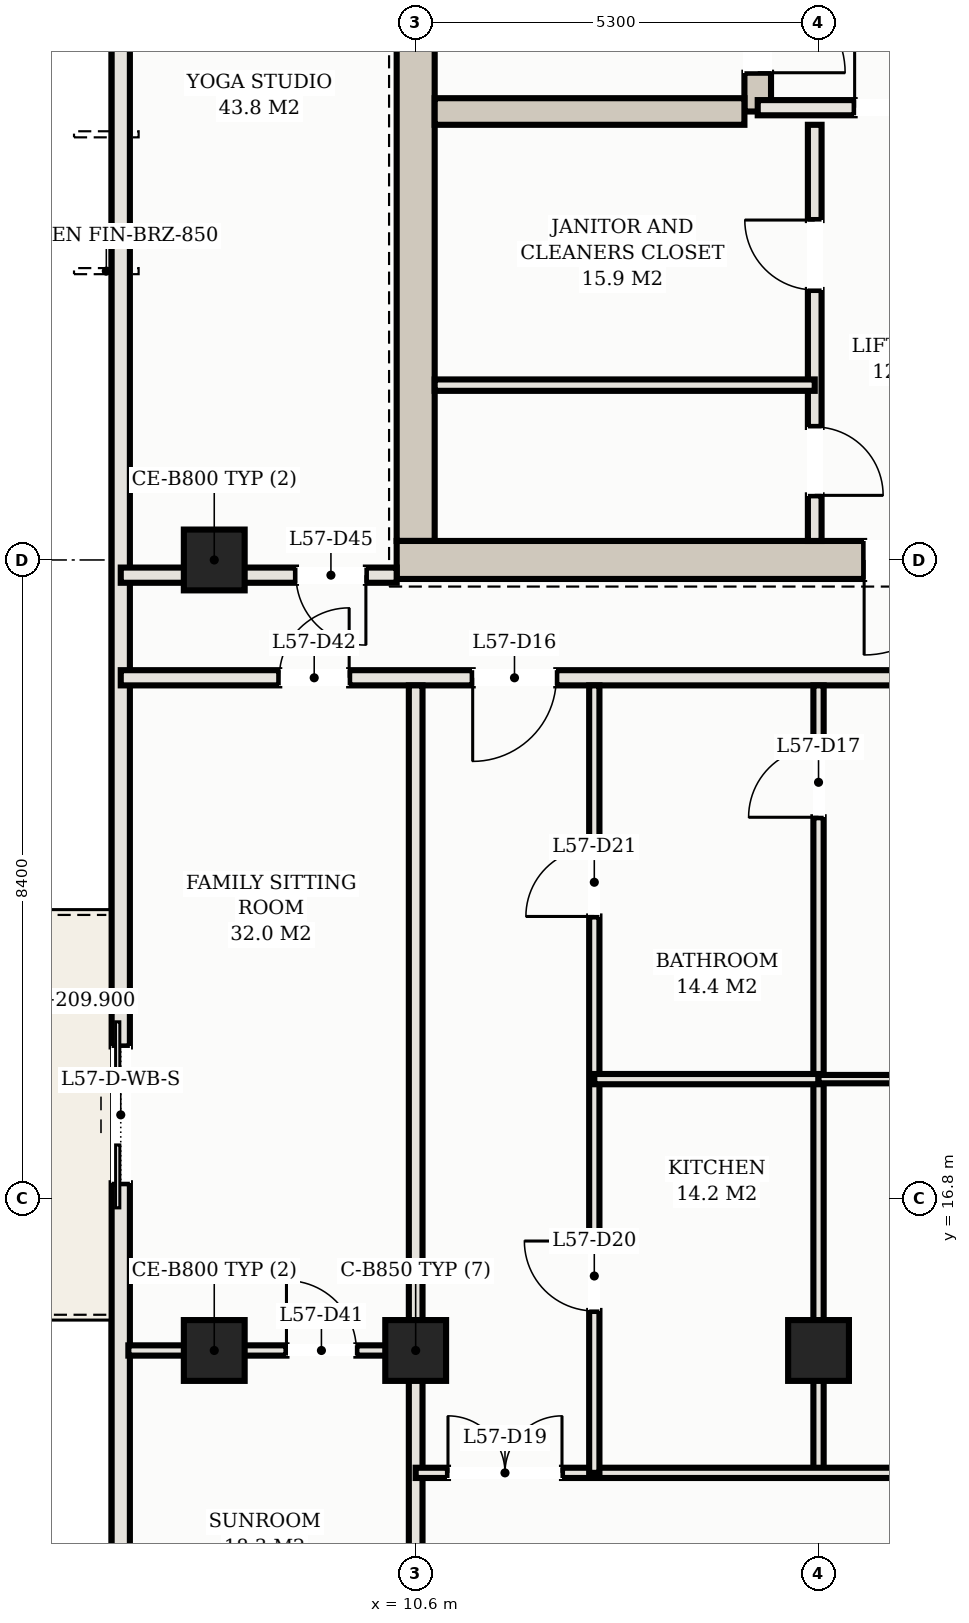
"""IFC4 building model, lengths in metres.
Left out: names, types, materials, properties, quantities, classifications, styles, units other than length and angle.
Written with IfcOpenShell. Run it as: python <this file> out.ifc"""

import sys

from ifc_helpers import new_model, si_unit, direction, frame, frame_2d, origin, origin_2d, place, context, subcontext, project, spatial, rectangle, hollow_rectangle, extrude, element, fill, save


model = new_model("IFC4")
c1 = context("Model", 3, precision=1e-05, world=origin(), true_north=direction((0.0, 1.0)))
c2 = subcontext(c1, "Body", "Model", "MODEL_VIEW")
j1 = project(units=[si_unit("LENGTHUNIT", "METRE"), si_unit("PLANEANGLEUNIT", "RADIAN")], contexts=[c1])
p1 = place(None, origin())
s1 = spatial("IfcSite", under=j1, at=p1, CompositionType="ELEMENT")
p2 = place(p1, origin())
s2 = spatial("IfcBuilding", under=s1, at=p2, CompositionType="ELEMENT")
p3 = place(p2, frame((0.0, 0.0, 209.9)))
s3 = spatial("IfcBuildingStorey", under=s2, at=p3, CompositionType="ELEMENT", Elevation=209.9)
p4 = place(p3, frame((10.6, 25.45, 0.0), z_axis=(0.0, 0.0, 1.0), x_axis=(0.0, 1.0, 0.0)))
e1 = element("IfcWall", 1, at=p4, inside=s3, PredefinedType="SHEAR", context=c2, shape_type="SweptSolid", body=[
    extrude(rectangle(XDim=14.3, YDim=0.5, at=frame_2d((7.15, 0.0))), origin(), (0.0, 0.0, 1.0), 3.11),
])
p5 = place(p3, frame((10.35, 25.2, 0.0), z_axis=(0.0, 0.0, 1.0), x_axis=(1.0, 0.0, 0.0)))
e2 = element("IfcWall", 2, at=p5, inside=s3, PredefinedType="SHEAR", context=c2, shape_type="SweptSolid", body=[
    extrude(rectangle(XDim=8.05, YDim=0.5, at=frame_2d((4.025, 0.0))), origin(), (0.0, 0.0, 1.0), 3.11),
])
p6 = place(p5, frame((6.15, 0.0, 0.0)))
e3 = element("IfcOpeningElement", 3, at=p6, cuts=e2, PredefinedType="OPENING", context=c2, shape_type="SweptSolid", body=[
    extrude(rectangle(XDim=1.25, YDim=2.2, at=frame_2d((0.625, 1.1))), frame((0.0, 0.26, 0.0), z_axis=(0.0, -1.0, 0.0), x_axis=(1.0, 0.0, 0.0)), (0.0, 0.0, 1.0), 0.52),
])
p7 = place(p3, frame((15.1, 31.1, 0.0), z_axis=(0.0, 0.0, 1.0), x_axis=(0.0, 1.0, 0.0)))
e4 = element("IfcWall", 4, at=p7, inside=s3, PredefinedType="SHEAR", context=c2, shape_type="SweptSolid", body=[
    extrude(rectangle(XDim=8.65, YDim=0.35, at=frame_2d((4.325, 0.0))), origin(), (0.0, 0.0, 1.0), 3.11),
])
p8 = place(p7, frame((0.51, 0.0, 0.0)))
e5 = element("IfcOpeningElement", 5, at=p8, cuts=e4, PredefinedType="OPENING", context=c2, shape_type="SweptSolid", body=[
    extrude(rectangle(XDim=1.15, YDim=2.2, at=frame_2d((0.575, 1.1))), frame((0.0, 0.185, 0.0), z_axis=(0.0, -1.0, 0.0), x_axis=(1.0, 0.0, 0.0)), (0.0, 0.0, 1.0), 0.37),
])
p9 = place(p3, frame((10.85, 31.1, 0.0), z_axis=(0.0, 0.0, 1.0), x_axis=(1.0, 0.0, 0.0)))
e6 = element("IfcWall", 6, at=p9, inside=s3, PredefinedType="SHEAR", context=c2, shape_type="SweptSolid", body=[
    extrude(rectangle(XDim=4.075, YDim=0.35, at=frame_2d((2.038, 0.0))), origin(), (0.0, 0.0, 1.0), 3.11),
])
for number, where, z_axis, x_axis in (
    (7, (10.6, 14.8, 0.0), (0.0, 0.0, 1.0), (1.0, 0.0, 0.0)),
    (8, (15.9, 14.8, 0.0), (0.0, 0.0, 1.0), (1.0, 0.0, 0.0)),
    (9, (7.95, 14.8, 0.0), (0.0, 0.0, 1.0), (1.0, 0.0, 0.0)),
    (10, (7.95, 25.2, 0.0), (0.0, 0.0, 1.0), (1.0, 0.0, 0.0)),
):
    element("IfcColumn", number, at=place(p3, frame(where, z_axis=z_axis, x_axis=x_axis)), inside=s3, PredefinedType="COLUMN", context=c2, shape_type="SweptSolid", body=[
        extrude(hollow_rectangle(XDim=0.8, YDim=0.8, WallThickness=0.028, at=origin_2d()), origin(), (0.0, 0.0, 1.0), 3.3),
    ])
p10 = place(p3, frame((6.72, 36.93, 0.0), z_axis=(0.0, 0.0, 1.0), x_axis=(0.0, -1.0, 0.0)))
e11 = element("IfcWall", 11, at=p10, inside=s3, PredefinedType="SOLIDWALL", context=c2, shape_type="SweptSolid", body=[
    extrude(rectangle(XDim=26.41, YDim=0.24, at=frame_2d((13.205, 0.0))), origin(), (0.0, 0.0, 1.0), 3.11),
])
p11 = place(p10, frame((18.13, 0.0, 0.0)))
e12 = element("IfcOpeningElement", 12, at=p11, cuts=e11, PredefinedType="OPENING", context=c2, shape_type="SweptSolid", body=[
    extrude(rectangle(XDim=1.8, YDim=2.2, at=frame_2d((0.9, 1.1))), frame((0.0, 0.13, 0.0), z_axis=(0.0, -1.0, 0.0), x_axis=(1.0, 0.0, 0.0)), (0.0, 0.0, 1.0), 0.26),
])
p12 = place(p3, frame((15.1, 31.15, 0.0), z_axis=(0.0, 0.0, 1.0), x_axis=(1.0, 0.0, 0.0)))
e13 = element("IfcWall", 13, at=p12, inside=s3, PredefinedType="PARTITIONING", context=c2, shape_type="SweptSolid", body=[
    extrude(rectangle(XDim=3.25, YDim=0.2, at=frame_2d((1.625, 0.0))), origin(), (0.0, 0.0, 1.0), 2.43),
])
p13 = place(p12, frame((1.275, 0.0, 0.0)))
e14 = element("IfcOpeningElement", 14, at=p13, cuts=e13, PredefinedType="OPENING", context=c2, shape_type="SweptSolid", body=[
    extrude(rectangle(XDim=1.25, YDim=2.2, at=frame_2d((0.625, 1.1))), frame((0.0, 0.11, 0.0), z_axis=(0.0, -1.0, 0.0), x_axis=(1.0, 0.0, 0.0)), (0.0, 0.0, 1.0), 0.22),
])
p14 = place(p3, frame((15.85, 25.45, 0.0), z_axis=(0.0, 0.0, 1.0), x_axis=(0.0, 1.0, 0.0)))
e15 = element("IfcWall", 15, at=p14, inside=s3, PredefinedType="PARTITIONING", context=c2, shape_type="SweptSolid", body=[
    extrude(rectangle(XDim=5.475, YDim=0.18, at=frame_2d((2.738, 0.0))), origin(), (0.0, 0.0, 1.0), 2.43),
])
p15 = place(p14, frame((0.6, 0.0, 0.0)))
e16 = element("IfcOpeningElement", 16, at=p15, cuts=e15, PredefinedType="OPENING", context=c2, shape_type="SweptSolid", body=[
    extrude(rectangle(XDim=0.9, YDim=2.15, at=frame_2d((0.45, 1.075))), frame((0.0, 0.1, 0.0), z_axis=(0.0, -1.0, 0.0), x_axis=(1.0, 0.0, 0.0)), (0.0, 0.0, 1.0), 0.2),
])
p16 = place(p14, frame((3.302, 0.0, 0.0)))
e17 = element("IfcOpeningElement", 17, at=p16, cuts=e15, PredefinedType="OPENING", context=c2, shape_type="SweptSolid", body=[
    extrude(rectangle(XDim=0.92, YDim=2.15, at=frame_2d((0.46, 1.075))), frame((0.0, 0.1, 0.0), z_axis=(0.0, -1.0, 0.0), x_axis=(1.0, 0.0, 0.0)), (0.0, 0.0, 1.0), 0.2),
])
p17 = place(p3, frame((10.85, 27.5, 0.0), z_axis=(0.0, 0.0, 1.0), x_axis=(1.0, 0.0, 0.0)))
e18 = element("IfcWall", 18, at=p17, inside=s3, PredefinedType="PARTITIONING", context=c2, shape_type="SweptSolid", body=[
    extrude(rectangle(XDim=5.0, YDim=0.15, at=frame_2d((2.5, 0.0))), origin(), (0.0, 0.0, 1.0), 2.43),
])
p18 = place(p3, frame((6.72, 23.65, 0.0), z_axis=(0.0, 0.0, 1.0), x_axis=(1.0, 0.0, 0.0)))
e19 = element("IfcWall", 19, at=p18, inside=s3, PredefinedType="PARTITIONING", context=c2, shape_type="SweptSolid", body=[
    extrude(rectangle(XDim=39.56, YDim=0.2, at=frame_2d((19.78, 0.0))), origin(), (0.0, 0.0, 1.0), 2.43),
])
p19 = place(p18, frame((4.63, 0.0, 0.0)))
e20 = element("IfcOpeningElement", 20, at=p19, cuts=e19, PredefinedType="OPENING", context=c2, shape_type="SweptSolid", body=[
    extrude(rectangle(XDim=1.1, YDim=2.25, at=frame_2d((0.55, 1.125))), frame((0.0, 0.11, 0.0), z_axis=(0.0, -1.0, 0.0), x_axis=(1.0, 0.0, 0.0)), (0.0, 0.0, 1.0), 0.22),
])
p20 = place(p18, frame((20.53, 0.0, 0.0)))
e21 = element("IfcOpeningElement", 21, at=p20, cuts=e19, PredefinedType="OPENING", context=c2, shape_type="SweptSolid", body=[
    extrude(rectangle(XDim=1.1, YDim=2.25, at=frame_2d((0.55, 1.125))), frame((0.0, 0.11, 0.0), z_axis=(0.0, -1.0, 0.0), x_axis=(1.0, 0.0, 0.0)), (0.0, 0.0, 1.0), 0.22),
])
p21 = place(p18, frame((2.085, 0.0, 0.0)))
e22 = element("IfcOpeningElement", 22, at=p21, cuts=e19, PredefinedType="OPENING", context=c2, shape_type="SweptSolid", body=[
    extrude(rectangle(XDim=0.92, YDim=2.15, at=frame_2d((0.46, 1.075))), frame((0.0, 0.11, 0.0), z_axis=(0.0, -1.0, 0.0), x_axis=(1.0, 0.0, 0.0)), (0.0, 0.0, 1.0), 0.22),
])
p22 = place(p18, frame((36.555, 0.0, 0.0)))
e23 = element("IfcOpeningElement", 23, at=p22, cuts=e19, PredefinedType="OPENING", context=c2, shape_type="SweptSolid", body=[
    extrude(rectangle(XDim=0.92, YDim=2.15, at=frame_2d((0.46, 1.075))), frame((0.0, 0.11, 0.0), z_axis=(0.0, -1.0, 0.0), x_axis=(1.0, 0.0, 0.0)), (0.0, 0.0, 1.0), 0.22),
])
p23 = place(p3, frame((6.72, 25.0, 0.0), z_axis=(0.0, 0.0, 1.0), x_axis=(1.0, 0.0, 0.0)))
e24 = element("IfcWall", 24, at=p23, inside=s3, PredefinedType="PARTITIONING", context=c2, shape_type="SweptSolid", body=[
    extrude(rectangle(XDim=3.63, YDim=0.2, at=frame_2d((1.815, 0.0))), origin(), (0.0, 0.0, 1.0), 2.43),
])
p24 = place(p23, frame((2.305, 0.0, 0.0)))
e25 = element("IfcOpeningElement", 25, at=p24, cuts=e24, PredefinedType="OPENING", context=c2, shape_type="SweptSolid", body=[
    extrude(rectangle(XDim=0.92, YDim=2.15, at=frame_2d((0.46, 1.075))), frame((0.0, 0.11, 0.0), z_axis=(0.0, -1.0, 0.0), x_axis=(1.0, 0.0, 0.0)), (0.0, 0.0, 1.0), 0.22),
])
p25 = place(p3, frame((10.6, 8.32, 0.0), z_axis=(0.0, 0.0, 1.0), x_axis=(0.0, 1.0, 0.0)))
e26 = element("IfcWall", 26, at=p25, inside=s3, PredefinedType="PARTITIONING", context=c2, shape_type="SweptSolid", body=[
    extrude(rectangle(XDim=15.23, YDim=0.18, at=frame_2d((7.615, 0.0))), origin(), (0.0, 0.0, 1.0), 2.43),
])
p26 = place(p3, frame((15.9, 14.8, 0.0), z_axis=(0.0, 0.0, 1.0), x_axis=(0.0, 1.0, 0.0)))
e27 = element("IfcWall", 27, at=p26, inside=s3, PredefinedType="PARTITIONING", context=c2, shape_type="SweptSolid", body=[
    extrude(rectangle(XDim=8.75, YDim=0.135, at=frame_2d((4.375, 0.0))), origin(), (0.0, 0.0, 1.0), 2.43),
])
p27 = place(p26, frame((7.015, 0.0, 0.0)))
e28 = element("IfcOpeningElement", 28, at=p27, cuts=e27, PredefinedType="OPENING", context=c2, shape_type="SweptSolid", body=[
    extrude(rectangle(XDim=0.92, YDim=2.15, at=frame_2d((0.46, 1.075))), frame((0.0, 0.078, 0.0), z_axis=(0.0, -1.0, 0.0), x_axis=(1.0, 0.0, 0.0)), (0.0, 0.0, 1.0), 0.155),
])
p28 = place(p3, frame((15.9, 13.19, 0.0), z_axis=(0.0, 0.0, 1.0), x_axis=(0.0, 1.0, 0.0)))
e29 = element("IfcWall", 29, at=p28, inside=s3, PredefinedType="PARTITIONING", context=c2, shape_type="SweptSolid", body=[
    extrude(rectangle(XDim=1.61, YDim=0.135, at=frame_2d((0.805, 0.0))), origin(), (0.0, 0.0, 1.0), 2.43),
])
p29 = place(p3, frame((10.6, 13.19, 0.0), z_axis=(0.0, 0.0, 1.0), x_axis=(1.0, 0.0, 0.0)))
e30 = element("IfcWall", 30, at=p29, inside=s3, PredefinedType="PARTITIONING", context=c2, shape_type="SweptSolid", body=[
    extrude(rectangle(XDim=10.6, YDim=0.135, at=frame_2d((5.3, 0.0))), origin(), (0.0, 0.0, 1.0), 2.43),
])
p30 = place(p29, frame((0.425, 0.0, 0.0)))
e31 = element("IfcOpeningElement", 31, at=p30, cuts=e30, PredefinedType="OPENING", context=c2, shape_type="SweptSolid", body=[
    extrude(rectangle(XDim=1.5, YDim=2.25, at=frame_2d((0.75, 1.125))), frame((0.0, 0.078, 0.0), z_axis=(0.0, -1.0, 0.0), x_axis=(1.0, 0.0, 0.0)), (0.0, 0.0, 1.0), 0.155),
])
p31 = place(p3, frame((12.95, 13.19, 0.0), z_axis=(0.0, 0.0, 1.0), x_axis=(0.0, 1.0, 0.0)))
e32 = element("IfcWall", 32, at=p31, inside=s3, PredefinedType="PARTITIONING", context=c2, shape_type="SweptSolid", body=[
    extrude(rectangle(XDim=10.36, YDim=0.135, at=frame_2d((5.18, 0.0))), origin(), (0.0, 0.0, 1.0), 2.43),
])
p32 = place(p31, frame((2.13, 0.0, 0.0)))
e33 = element("IfcOpeningElement", 33, at=p32, cuts=e32, PredefinedType="OPENING", context=c2, shape_type="SweptSolid", body=[
    extrude(rectangle(XDim=0.92, YDim=2.15, at=frame_2d((0.46, 1.075))), frame((0.0, 0.078, 0.0), z_axis=(0.0, -1.0, 0.0), x_axis=(1.0, 0.0, 0.0)), (0.0, 0.0, 1.0), 0.155),
])
p33 = place(p31, frame((7.32, 0.0, 0.0)))
e34 = element("IfcOpeningElement", 34, at=p33, cuts=e32, PredefinedType="OPENING", context=c2, shape_type="SweptSolid", body=[
    extrude(rectangle(XDim=0.9, YDim=2.15, at=frame_2d((0.45, 1.075))), frame((0.0, 0.078, 0.0), z_axis=(0.0, -1.0, 0.0), x_axis=(1.0, 0.0, 0.0)), (0.0, 0.0, 1.0), 0.155),
])
p34 = place(p3, frame((12.95, 18.37, 0.0), z_axis=(0.0, 0.0, 1.0), x_axis=(1.0, 0.0, 0.0)))
e35 = element("IfcWall", 35, at=p34, inside=s3, PredefinedType="PARTITIONING", context=c2, shape_type="SweptSolid", body=[
    extrude(rectangle(XDim=2.95, YDim=0.135, at=frame_2d((1.475, 0.0))), origin(), (0.0, 0.0, 1.0), 2.43),
])
p35 = place(p3, frame((15.9, 18.37, 0.0), z_axis=(0.0, 0.0, 1.0), x_axis=(1.0, 0.0, 0.0)))
e36 = element("IfcWall", 36, at=p35, inside=s3, PredefinedType="MOVABLE", context=c2, shape_type="SweptSolid", body=[
    extrude(rectangle(XDim=5.3, YDim=0.11, at=frame_2d((2.65, 0.0))), origin(), (0.0, 0.0, 1.0), 2.43),
])
p36 = place(p35, frame((1.84, 0.0, 0.0)))
e37 = element("IfcOpeningElement", 37, at=p36, cuts=e36, PredefinedType="OPENING", context=c2, shape_type="SweptSolid", body=[
    extrude(rectangle(XDim=0.92, YDim=2.15, at=frame_2d((0.46, 1.075))), frame((0.0, 0.065, 0.0), z_axis=(0.0, -1.0, 0.0), x_axis=(1.0, 0.0, 0.0)), (0.0, 0.0, 1.0), 0.13),
])
p37 = place(p3, frame((6.82, 14.8, 0.0), z_axis=(0.0, 0.0, 1.0), x_axis=(1.0, 0.0, 0.0)))
e38 = element("IfcWall", 38, at=p37, inside=s3, PredefinedType="PARTITIONING", context=c2, shape_type="SweptSolid", body=[
    extrude(rectangle(XDim=3.78, YDim=0.135, at=frame_2d((1.89, 0.0))), origin(), (0.0, 0.0, 1.0), 2.43),
])
p38 = place(p37, frame((2.08, 0.0, 0.0)))
e39 = element("IfcOpeningElement", 39, at=p38, cuts=e38, PredefinedType="OPENING", context=c2, shape_type="SweptSolid", body=[
    extrude(rectangle(XDim=0.92, YDim=2.15, at=frame_2d((0.46, 1.075))), frame((0.0, 0.078, 0.0), z_axis=(0.0, -1.0, 0.0), x_axis=(1.0, 0.0, 0.0)), (0.0, 0.0, 1.0), 0.155),
])
p39 = place(p11, frame((1.8, 0.0, 0.0), z_axis=(0.0, 0.0, 1.0), x_axis=(-1.0, 0.0, 0.0)))
e40 = element("IfcDoor", 40, at=p39, inside=s3, OperationType="DOUBLE_DOOR_SLIDING", PredefinedType="DOOR", context=c2, shape_type="SweptSolid", body=[
    extrude(rectangle(XDim=1.8, YDim=2.2, at=frame_2d((0.9, 1.1))), frame((0.0, 0.025, 0.0), z_axis=(0.0, -1.0, 0.0), x_axis=(1.0, 0.0, 0.0)), (0.0, 0.0, 1.0), 0.05),
])
fill(e12, e40)
p40 = place(p6, frame((1.25, 0.0, 0.0), z_axis=(0.0, 0.0, 1.0), x_axis=(-1.0, 0.0, 0.0)))
e41 = element("IfcDoor", 41, at=p40, inside=s3, OperationType="SINGLE_SWING_RIGHT", PredefinedType="DOOR", context=c2, shape_type="SweptSolid", body=[
    extrude(rectangle(XDim=1.25, YDim=2.2, at=frame_2d((0.625, 1.1))), frame((0.0, 0.025, 0.0), z_axis=(0.0, -1.0, 0.0), x_axis=(1.0, 0.0, 0.0)), (0.0, 0.0, 1.0), 0.05),
])
fill(e3, e41)
p41 = place(p13, origin())
e42 = element("IfcDoor", 42, at=p41, inside=s3, OperationType="SINGLE_SWING_LEFT", PredefinedType="DOOR", context=c2, shape_type="SweptSolid", body=[
    extrude(rectangle(XDim=1.25, YDim=2.2, at=frame_2d((0.625, 1.1))), frame((0.0, 0.025, 0.0), z_axis=(0.0, -1.0, 0.0), x_axis=(1.0, 0.0, 0.0)), (0.0, 0.0, 1.0), 0.05),
])
fill(e14, e42)
p42 = place(p8, frame((1.15, 0.0, 0.0), z_axis=(0.0, 0.0, 1.0), x_axis=(-1.0, 0.0, 0.0)))
e43 = element("IfcDoor", 43, at=p42, inside=s3, OperationType="SINGLE_SWING_RIGHT", PredefinedType="DOOR", context=c2, shape_type="SweptSolid", body=[
    extrude(rectangle(XDim=1.15, YDim=2.2, at=frame_2d((0.575, 1.1))), frame((0.0, 0.025, 0.0), z_axis=(0.0, -1.0, 0.0), x_axis=(1.0, 0.0, 0.0)), (0.0, 0.0, 1.0), 0.05),
])
fill(e5, e43)
p43 = place(p15, frame((0.9, 0.0, 0.0), z_axis=(0.0, 0.0, 1.0), x_axis=(-1.0, 0.0, 0.0)))
e44 = element("IfcDoor", 44, at=p43, inside=s3, OperationType="SINGLE_SWING_RIGHT", PredefinedType="DOOR", context=c2, shape_type="SweptSolid", body=[
    extrude(rectangle(XDim=0.9, YDim=2.15, at=frame_2d((0.45, 1.075))), frame((0.0, 0.025, 0.0), z_axis=(0.0, -1.0, 0.0), x_axis=(1.0, 0.0, 0.0)), (0.0, 0.0, 1.0), 0.05),
])
fill(e16, e44)
p44 = place(p16, origin())
e45 = element("IfcDoor", 45, at=p44, inside=s3, OperationType="SINGLE_SWING_RIGHT", PredefinedType="DOOR", context=c2, shape_type="SweptSolid", body=[
    extrude(rectangle(XDim=0.92, YDim=2.15, at=frame_2d((0.46, 1.075))), frame((0.0, 0.025, 0.0), z_axis=(0.0, -1.0, 0.0), x_axis=(1.0, 0.0, 0.0)), (0.0, 0.0, 1.0), 0.05),
])
fill(e17, e45)
p45 = place(p19, frame((1.1, 0.0, 0.0), z_axis=(0.0, 0.0, 1.0), x_axis=(-1.0, 0.0, 0.0)))
e46 = element("IfcDoor", 46, at=p45, inside=s3, OperationType="SINGLE_SWING_RIGHT", PredefinedType="DOOR", context=c2, shape_type="SweptSolid", body=[
    extrude(rectangle(XDim=1.1, YDim=2.25, at=frame_2d((0.55, 1.125))), frame((0.0, 0.025, 0.0), z_axis=(0.0, -1.0, 0.0), x_axis=(1.0, 0.0, 0.0)), (0.0, 0.0, 1.0), 0.05),
])
fill(e20, e46)
p46 = place(p27, origin())
e47 = element("IfcDoor", 47, at=p46, inside=s3, OperationType="SINGLE_SWING_LEFT", PredefinedType="DOOR", context=c2, shape_type="SweptSolid", body=[
    extrude(rectangle(XDim=0.92, YDim=2.15, at=frame_2d((0.46, 1.075))), frame((0.0, 0.025, 0.0), z_axis=(0.0, -1.0, 0.0), x_axis=(1.0, 0.0, 0.0)), (0.0, 0.0, 1.0), 0.05),
])
fill(e28, e47)
p47 = place(p30, origin())
e48 = element("IfcDoor", 48, at=p47, inside=s3, OperationType="DOUBLE_DOOR_SINGLE_SWING", PredefinedType="DOOR", context=c2, shape_type="SweptSolid", body=[
    extrude(rectangle(XDim=1.5, YDim=2.25, at=frame_2d((0.75, 1.125))), frame((0.0, 0.025, 0.0), z_axis=(0.0, -1.0, 0.0), x_axis=(1.0, 0.0, 0.0)), (0.0, 0.0, 1.0), 0.05),
])
fill(e31, e48)
p48 = place(p32, origin())
e49 = element("IfcDoor", 49, at=p48, inside=s3, OperationType="SINGLE_SWING_RIGHT", PredefinedType="DOOR", context=c2, shape_type="SweptSolid", body=[
    extrude(rectangle(XDim=0.92, YDim=2.15, at=frame_2d((0.46, 1.075))), frame((0.0, 0.025, 0.0), z_axis=(0.0, -1.0, 0.0), x_axis=(1.0, 0.0, 0.0)), (0.0, 0.0, 1.0), 0.05),
])
fill(e33, e49)
p49 = place(p33, origin())
e50 = element("IfcDoor", 50, at=p49, inside=s3, OperationType="SINGLE_SWING_LEFT", PredefinedType="DOOR", context=c2, shape_type="SweptSolid", body=[
    extrude(rectangle(XDim=0.9, YDim=2.15, at=frame_2d((0.45, 1.075))), frame((0.0, 0.025, 0.0), z_axis=(0.0, -1.0, 0.0), x_axis=(1.0, 0.0, 0.0)), (0.0, 0.0, 1.0), 0.05),
])
fill(e34, e50)
p50 = place(p38, origin())
e51 = element("IfcDoor", 51, at=p50, inside=s3, OperationType="SINGLE_SWING_LEFT", PredefinedType="DOOR", context=c2, shape_type="SweptSolid", body=[
    extrude(rectangle(XDim=0.92, YDim=2.15, at=frame_2d((0.46, 1.075))), frame((0.0, 0.025, 0.0), z_axis=(0.0, -1.0, 0.0), x_axis=(1.0, 0.0, 0.0)), (0.0, 0.0, 1.0), 0.05),
])
fill(e39, e51)
p51 = place(p21, origin())
e52 = element("IfcDoor", 52, at=p51, inside=s3, OperationType="SINGLE_SWING_RIGHT", PredefinedType="DOOR", context=c2, shape_type="SweptSolid", body=[
    extrude(rectangle(XDim=0.92, YDim=2.15, at=frame_2d((0.46, 1.075))), frame((0.0, 0.025, 0.0), z_axis=(0.0, -1.0, 0.0), x_axis=(1.0, 0.0, 0.0)), (0.0, 0.0, 1.0), 0.05),
])
fill(e22, e52)
p52 = place(p24, frame((0.92, 0.0, 0.0), z_axis=(0.0, 0.0, 1.0), x_axis=(-1.0, 0.0, 0.0)))
e53 = element("IfcDoor", 53, at=p52, inside=s3, OperationType="SINGLE_SWING_LEFT", PredefinedType="DOOR", context=c2, shape_type="SweptSolid", body=[
    extrude(rectangle(XDim=0.92, YDim=2.15, at=frame_2d((0.46, 1.075))), frame((0.0, 0.025, 0.0), z_axis=(0.0, -1.0, 0.0), x_axis=(1.0, 0.0, 0.0)), (0.0, 0.0, 1.0), 0.05),
])
fill(e25, e53)
save(model, sys.argv[1])
